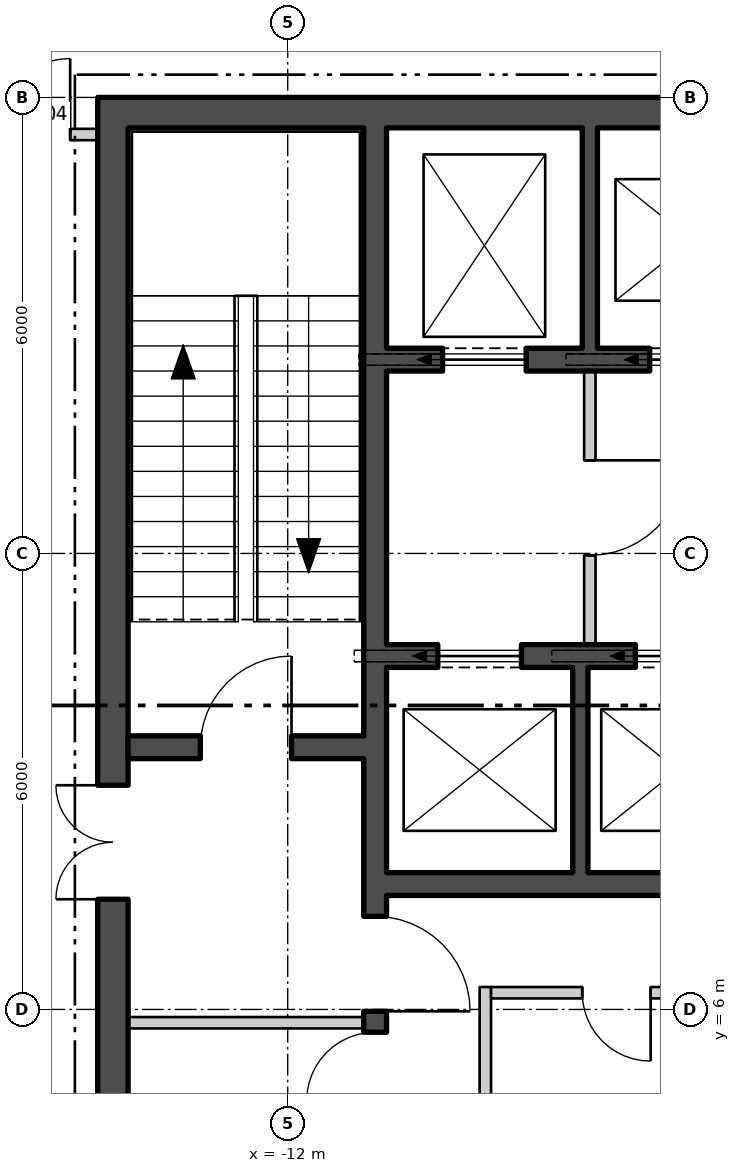
"""IFC4 building model, lengths in metres.
Left out: names, types, materials, properties, quantities, classifications, styles, units other than length and angle.
Written with IfcOpenShell. Run it as: python <this file> out.ifc"""

import sys

from ifc_helpers import new_model, si_unit, direction, frame, frame_2d, origin, place, context, subcontext, project, spatial, polyline, rectangle, outline, extrude, element, fill, save


model = new_model("IFC4")
c1 = context("Model", 3, precision=1e-05, world=origin(), true_north=direction((0.0, 1.0)))
c2 = subcontext(c1, "Body", "Model", "MODEL_VIEW")
j1 = project(units=[si_unit("LENGTHUNIT", "METRE"), si_unit("PLANEANGLEUNIT", "RADIAN")], contexts=[c1])
p1 = place(None, origin())
s1 = spatial("IfcSite", under=j1, at=p1, CompositionType="ELEMENT")
p2 = place(p1, origin())
s2 = spatial("IfcBuilding", under=s1, at=p2, CompositionType="ELEMENT")
p3 = place(p2, frame((0.0, 0.0, 321.0)))
s3 = spatial("IfcBuildingStorey", under=s2, at=p3, CompositionType="ELEMENT", Elevation=321.0)
p4 = place(p3, frame((-24.875, 16.493, -0.18), z_axis=(0.0, 0.0, 1.0), x_axis=(0.500000141277, -0.866025322218, 0.0)))
e1 = element("IfcWall", 1, at=p4, inside=s3, PredefinedType="SOLIDWALL", context=c2, shape_type="SweptSolid", body=[
    extrude(outline(polyline([(-0.13, -0.225), (45.86, -0.225), (45.6, 0.225), (0.13, 0.225), (-0.13, -0.225)])), origin(), (0.0, 0.0, 1.0), 3.98),
])
p5 = place(p4, frame((1.424, 0.0, 1.08)))
e2 = element("IfcOpeningElement", 2, at=p5, cuts=e1, PredefinedType="OPENING", context=c2, shape_type="SweptSolid", body=[
    extrude(rectangle(XDim=2.4, YDim=2.3, at=frame_2d((1.2, 1.15))), frame((0.0, 0.235, 0.0), z_axis=(0.0, -1.0, 0.0), x_axis=(1.0, 0.0, 0.0)), (0.0, 0.0, 1.0), 0.47),
])
p6 = place(p4, frame((5.892, 0.0, 1.08)))
e3 = element("IfcOpeningElement", 3, at=p6, cuts=e1, PredefinedType="OPENING", context=c2, shape_type="SweptSolid", body=[
    extrude(rectangle(XDim=2.4, YDim=2.3, at=frame_2d((1.2, 1.15))), frame((0.0, 0.235, 0.0), z_axis=(0.0, -1.0, 0.0), x_axis=(1.0, 0.0, 0.0)), (0.0, 0.0, 1.0), 0.47),
])
p7 = place(p4, frame((10.399, 0.0, 1.08)))
e4 = element("IfcOpeningElement", 4, at=p7, cuts=e1, PredefinedType="OPENING", context=c2, shape_type="SweptSolid", body=[
    extrude(rectangle(XDim=2.4, YDim=2.3, at=frame_2d((1.2, 1.15))), frame((0.0, 0.235, 0.0), z_axis=(0.0, -1.0, 0.0), x_axis=(1.0, 0.0, 0.0)), (0.0, 0.0, 1.0), 0.47),
])
p8 = place(p4, frame((14.905, 0.0, 1.08)))
e5 = element("IfcOpeningElement", 5, at=p8, cuts=e1, PredefinedType="OPENING", context=c2, shape_type="SweptSolid", body=[
    extrude(rectangle(XDim=2.4, YDim=2.3, at=frame_2d((1.2, 1.15))), frame((0.0, 0.235, 0.0), z_axis=(0.0, -1.0, 0.0), x_axis=(1.0, 0.0, 0.0)), (0.0, 0.0, 1.0), 0.47),
])
p9 = place(p4, frame((19.412, 0.0, 1.08)))
e6 = element("IfcOpeningElement", 6, at=p9, cuts=e1, PredefinedType="OPENING", context=c2, shape_type="SweptSolid", body=[
    extrude(rectangle(XDim=2.4, YDim=2.3, at=frame_2d((1.2, 1.15))), frame((0.0, 0.235, 0.0), z_axis=(0.0, -1.0, 0.0), x_axis=(1.0, 0.0, 0.0)), (0.0, 0.0, 1.0), 0.47),
])
p10 = place(p4, frame((23.918, 0.0, 1.08)))
e7 = element("IfcOpeningElement", 7, at=p10, cuts=e1, PredefinedType="OPENING", context=c2, shape_type="SweptSolid", body=[
    extrude(rectangle(XDim=2.4, YDim=2.3, at=frame_2d((1.2, 1.15))), frame((0.0, 0.235, 0.0), z_axis=(0.0, -1.0, 0.0), x_axis=(1.0, 0.0, 0.0)), (0.0, 0.0, 1.0), 0.47),
])
p11 = place(p4, frame((28.425, 0.0, 1.08)))
e8 = element("IfcOpeningElement", 8, at=p11, cuts=e1, PredefinedType="OPENING", context=c2, shape_type="SweptSolid", body=[
    extrude(rectangle(XDim=2.4, YDim=2.3, at=frame_2d((1.2, 1.15))), frame((0.0, 0.235, 0.0), z_axis=(0.0, -1.0, 0.0), x_axis=(1.0, 0.0, 0.0)), (0.0, 0.0, 1.0), 0.47),
])
p12 = place(p4, frame((37.438, 0.0, 1.08)))
e9 = element("IfcOpeningElement", 9, at=p12, cuts=e1, PredefinedType="OPENING", context=c2, shape_type="SweptSolid", body=[
    extrude(rectangle(XDim=2.4, YDim=2.3, at=frame_2d((1.2, 1.15))), frame((0.0, 0.235, 0.0), z_axis=(0.0, -1.0, 0.0), x_axis=(1.0, 0.0, 0.0)), (0.0, 0.0, 1.0), 0.47),
])
p13 = place(p4, frame((41.907, 0.0, 1.08)))
e10 = element("IfcOpeningElement", 10, at=p13, cuts=e1, PredefinedType="OPENING", context=c2, shape_type="SweptSolid", body=[
    extrude(rectangle(XDim=2.4, YDim=2.3, at=frame_2d((1.2, 1.15))), frame((0.0, 0.235, 0.0), z_axis=(0.0, -1.0, 0.0), x_axis=(1.0, 0.0, 0.0)), (0.0, 0.0, 1.0), 0.47),
])
p14 = place(p3, frame((-14.5, 17.8, 0.0), z_axis=(0.0, 0.0, 1.0), x_axis=(1.0, 0.0, 0.0)))
e11 = element("IfcWall", 11, at=p14, inside=s3, PredefinedType="SHEAR", context=c2, shape_type="SweptSolid", body=[
    extrude(rectangle(XDim=29.0, YDim=0.4, at=frame_2d((14.5, 0.0))), origin(), (0.0, 0.0, 1.0), 4.0),
])
p15 = place(p3, frame((-14.3, 4.4, 0.0), z_axis=(0.0, 0.0, 1.0), x_axis=(0.0, 1.0, 0.0)))
e12 = element("IfcWall", 12, at=p15, inside=s3, PredefinedType="SHEAR", context=c2, shape_type="SweptSolid", body=[
    extrude(rectangle(XDim=13.2, YDim=0.4, at=frame_2d((6.6, 0.0))), origin(), (0.0, 0.0, 1.0), 4.0),
])
p16 = place(p15, frame((3.05, 0.0, 0.0)))
e13 = element("IfcOpeningElement", 13, at=p16, cuts=e12, PredefinedType="OPENING", context=c2, shape_type="SweptSolid", body=[
    extrude(rectangle(XDim=1.5, YDim=2.1, at=frame_2d((0.75, 1.05))), frame((0.0, 0.21, 0.0), z_axis=(0.0, -1.0, 0.0), x_axis=(1.0, 0.0, 0.0)), (0.0, 0.0, 1.0), 0.42),
])
p17 = place(p3, frame((-10.85, 4.4, 0.0), z_axis=(0.0, 0.0, 1.0), x_axis=(0.0, 1.0, 0.0)))
e14 = element("IfcWall", 14, at=p17, inside=s3, PredefinedType="SHEAR", context=c2, shape_type="SweptSolid", body=[
    extrude(rectangle(XDim=13.2, YDim=0.3, at=frame_2d((6.6, 0.0))), origin(), (0.0, 0.0, 1.0), 4.0),
])
p18 = place(p17, frame((1.575, 0.0, 0.0)))
e15 = element("IfcOpeningElement", 15, at=p18, cuts=e14, PredefinedType="OPENING", context=c2, shape_type="SweptSolid", body=[
    extrude(rectangle(XDim=1.25, YDim=2.1, at=frame_2d((0.625, 1.05))), frame((0.0, 0.16, 0.0), z_axis=(0.0, -1.0, 0.0), x_axis=(1.0, 0.0, 0.0)), (0.0, 0.0, 1.0), 0.32),
])
p19 = place(p17, frame((0.4, 0.0, 0.0)))
e16 = element("IfcOpeningElement", 16, at=p19, cuts=e14, PredefinedType="OPENING", context=c2, shape_type="SweptSolid", body=[
    extrude(rectangle(XDim=0.9, YDim=2.1, at=frame_2d((0.45, 1.05))), frame((0.0, 0.16, 0.0), z_axis=(0.0, -1.0, 0.0), x_axis=(1.0, 0.0, 0.0)), (0.0, 0.0, 1.0), 0.32),
])
p20 = place(p3, frame((-14.1, 9.45, 0.0), z_axis=(0.0, 0.0, 1.0), x_axis=(1.0, 0.0, 0.0)))
e17 = element("IfcWall", 17, at=p20, inside=s3, PredefinedType="SHEAR", context=c2, shape_type="SweptSolid", body=[
    extrude(rectangle(XDim=3.1, YDim=0.3, at=frame_2d((1.55, 0.0))), origin(), (0.0, 0.0, 1.0), 4.0),
])
p21 = place(p20, frame((0.95, 0.0, 0.0)))
e18 = element("IfcOpeningElement", 18, at=p21, cuts=e17, PredefinedType="OPENING", context=c2, shape_type="SweptSolid", body=[
    extrude(rectangle(XDim=1.2, YDim=2.1, at=frame_2d((0.6, 1.05))), frame((0.0, 0.16, 0.0), z_axis=(0.0, -1.0, 0.0), x_axis=(1.0, 0.0, 0.0)), (0.0, 0.0, 1.0), 0.32),
])
p22 = place(p3, frame((-10.7, 14.55, 0.0), z_axis=(0.0, 0.0, 1.0), x_axis=(1.0, 0.0, 0.0)))
e19 = element("IfcWall", 19, at=p22, inside=s3, PredefinedType="SHEAR", context=c2, shape_type="SweptSolid", body=[
    extrude(rectangle(XDim=21.4, YDim=0.3, at=frame_2d((10.7, 0.0))), origin(), (0.0, 0.0, 1.0), 4.0),
])
p23 = place(p22, frame((0.738, 0.0, 0.0)))
e20 = element("IfcOpeningElement", 20, at=p23, cuts=e19, PredefinedType="OPENING", context=c2, shape_type="SweptSolid", body=[
    extrude(rectangle(XDim=1.1, YDim=2.1, at=frame_2d((0.55, 1.05))), frame((0.0, 0.16, 0.0), z_axis=(0.0, -1.0, 0.0), x_axis=(1.0, 0.0, 0.0)), (0.0, 0.0, 1.0), 0.32),
])
p24 = place(p22, frame((3.462, 0.0, 0.0)))
e21 = element("IfcOpeningElement", 21, at=p24, cuts=e19, PredefinedType="OPENING", context=c2, shape_type="SweptSolid", body=[
    extrude(rectangle(XDim=1.1, YDim=2.1, at=frame_2d((0.55, 1.05))), frame((0.0, 0.16, 0.0), z_axis=(0.0, -1.0, 0.0), x_axis=(1.0, 0.0, 0.0)), (0.0, 0.0, 1.0), 0.32),
])
p25 = place(p22, frame((6.138, 0.0, 0.0)))
e22 = element("IfcOpeningElement", 22, at=p25, cuts=e19, PredefinedType="OPENING", context=c2, shape_type="SweptSolid", body=[
    extrude(rectangle(XDim=1.1, YDim=2.1, at=frame_2d((0.55, 1.05))), frame((0.0, 0.16, 0.0), z_axis=(0.0, -1.0, 0.0), x_axis=(1.0, 0.0, 0.0)), (0.0, 0.0, 1.0), 0.32),
])
p26 = place(p22, frame((8.812, 0.0, 0.0)))
e23 = element("IfcOpeningElement", 23, at=p26, cuts=e19, PredefinedType="OPENING", context=c2, shape_type="SweptSolid", body=[
    extrude(rectangle(XDim=1.1, YDim=2.1, at=frame_2d((0.55, 1.05))), frame((0.0, 0.16, 0.0), z_axis=(0.0, -1.0, 0.0), x_axis=(1.0, 0.0, 0.0)), (0.0, 0.0, 1.0), 0.32),
])
p27 = place(p22, frame((19.562, 0.0, 0.0)))
e24 = element("IfcOpeningElement", 24, at=p27, cuts=e19, PredefinedType="OPENING", context=c2, shape_type="SweptSolid", body=[
    extrude(rectangle(XDim=1.1, YDim=2.1, at=frame_2d((0.55, 1.05))), frame((0.0, 0.16, 0.0), z_axis=(0.0, -1.0, 0.0), x_axis=(1.0, 0.0, 0.0)), (0.0, 0.0, 1.0), 0.32),
])
p28 = place(p22, frame((12.875, 0.0, 0.0)))
e25 = element("IfcOpeningElement", 25, at=p28, cuts=e19, PredefinedType="OPENING", context=c2, shape_type="SweptSolid", body=[
    extrude(rectangle(XDim=1.0, YDim=2.1, at=frame_2d((0.5, 1.05))), frame((0.0, 0.16, 0.0), z_axis=(0.0, -1.0, 0.0), x_axis=(1.0, 0.0, 0.0)), (0.0, 0.0, 1.0), 0.32),
])
p29 = place(p22, frame((16.887, 0.0, 0.0)))
e26 = element("IfcOpeningElement", 26, at=p29, cuts=e19, PredefinedType="OPENING", context=c2, shape_type="SweptSolid", body=[
    extrude(rectangle(XDim=1.0, YDim=2.1, at=frame_2d((0.5, 1.05))), frame((0.0, 0.16, 0.0), z_axis=(0.0, -1.0, 0.0), x_axis=(1.0, 0.0, 0.0)), (0.0, 0.0, 1.0), 0.32),
])
p30 = place(p3, frame((-10.7, 10.65, 0.0), z_axis=(0.0, 0.0, 1.0), x_axis=(1.0, 0.0, 0.0)))
e27 = element("IfcWall", 27, at=p30, inside=s3, PredefinedType="SHEAR", context=c2, shape_type="SweptSolid", body=[
    extrude(rectangle(XDim=10.3, YDim=0.3, at=frame_2d((5.15, 0.0))), origin(), (0.0, 0.0, 1.0), 4.0),
])
p31 = place(p30, frame((0.675, 0.0, 0.0)))
e28 = element("IfcOpeningElement", 28, at=p31, cuts=e27, PredefinedType="OPENING", context=c2, shape_type="SweptSolid", body=[
    extrude(rectangle(XDim=1.1, YDim=2.1, at=frame_2d((0.55, 1.05))), frame((0.0, 0.16, 0.0), z_axis=(0.0, -1.0, 0.0), x_axis=(1.0, 0.0, 0.0)), (0.0, 0.0, 1.0), 0.32),
])
p32 = place(p30, frame((3.275, 0.0, 0.0)))
e29 = element("IfcOpeningElement", 29, at=p32, cuts=e27, PredefinedType="OPENING", context=c2, shape_type="SweptSolid", body=[
    extrude(rectangle(XDim=1.1, YDim=2.1, at=frame_2d((0.55, 1.05))), frame((0.0, 0.16, 0.0), z_axis=(0.0, -1.0, 0.0), x_axis=(1.0, 0.0, 0.0)), (0.0, 0.0, 1.0), 0.32),
])
p33 = place(p30, frame((5.825, 0.0, 0.0)))
e30 = element("IfcOpeningElement", 30, at=p33, cuts=e27, PredefinedType="OPENING", context=c2, shape_type="SweptSolid", body=[
    extrude(rectangle(XDim=1.1, YDim=2.1, at=frame_2d((0.55, 1.05))), frame((0.0, 0.16, 0.0), z_axis=(0.0, -1.0, 0.0), x_axis=(1.0, 0.0, 0.0)), (0.0, 0.0, 1.0), 0.32),
])
p34 = place(p30, frame((8.425, 0.0, 0.0)))
e31 = element("IfcOpeningElement", 31, at=p34, cuts=e27, PredefinedType="OPENING", context=c2, shape_type="SweptSolid", body=[
    extrude(rectangle(XDim=1.0, YDim=2.1, at=frame_2d((0.5, 1.05))), frame((0.0, 0.16, 0.0), z_axis=(0.0, -1.0, 0.0), x_axis=(1.0, 0.0, 0.0)), (0.0, 0.0, 1.0), 0.32),
])
p35 = place(p3, frame((-10.7, 7.65, 0.0), z_axis=(0.0, 0.0, 1.0), x_axis=(1.0, 0.0, 0.0)))
e32 = element("IfcWall", 32, at=p35, inside=s3, PredefinedType="SHEAR", context=c2, shape_type="SweptSolid", body=[
    extrude(rectangle(XDim=10.3, YDim=0.3, at=frame_2d((5.15, 0.0))), origin(), (0.0, 0.0, 1.0), 4.0),
])
p36 = place(p3, frame((-8.025, 14.7, 0.0), z_axis=(0.0, 0.0, 1.0), x_axis=(0.0, 1.0, 0.0)))
e33 = element("IfcWall", 33, at=p36, inside=s3, PredefinedType="SHEAR", context=c2, shape_type="SweptSolid", body=[
    extrude(rectangle(XDim=2.9, YDim=0.2, at=frame_2d((1.45, 0.0))), origin(), (0.0, 0.0, 1.0), 4.0),
])
p37 = place(p3, frame((-8.15, 7.8, 0.0), z_axis=(0.0, 0.0, 1.0), x_axis=(0.0, 1.0, 0.0)))
e34 = element("IfcWall", 34, at=p37, inside=s3, PredefinedType="SHEAR", context=c2, shape_type="SweptSolid", body=[
    extrude(rectangle(XDim=2.7, YDim=0.2, at=frame_2d((1.35, 0.0))), origin(), (0.0, 0.0, 1.0), 4.0),
])
p38 = place(p3, frame((-8.025, 10.8, 0.0), z_axis=(0.0, 0.0, 1.0), x_axis=(0.0, 1.0, 0.0)))
e35 = element("IfcWall", 35, at=p38, inside=s3, PredefinedType="PARTITIONING", context=c2, shape_type="SweptSolid", body=[
    extrude(rectangle(XDim=3.6, YDim=0.15, at=frame_2d((1.8, 0.0))), origin(), (0.0, 0.0, 1.0), 4.0),
])
p39 = place(p38, frame((1.175, 0.0, 0.0)))
e36 = element("IfcOpeningElement", 36, at=p39, cuts=e35, PredefinedType="OPENING", context=c2, shape_type="SweptSolid", body=[
    extrude(rectangle(XDim=1.25, YDim=2.1, at=frame_2d((0.625, 1.05))), frame((0.0, 0.085, 0.0), z_axis=(0.0, -1.0, 0.0), x_axis=(1.0, 0.0, 0.0)), (0.0, 0.0, 1.0), 0.17),
])
p40 = place(p3, frame((-14.1, 5.825, 0.0), z_axis=(0.0, 0.0, 1.0), x_axis=(1.0, 0.0, 0.0)))
e37 = element("IfcWall", 37, at=p40, inside=s3, PredefinedType="PARTITIONING", context=c2, shape_type="SweptSolid", body=[
    extrude(rectangle(XDim=3.1, YDim=0.15, at=frame_2d((1.55, 0.0))), origin(), (0.0, 0.0, 1.0), 4.0),
])
p41 = place(p3, frame((-9.4, 4.4, 0.0), z_axis=(0.0, 0.0, 1.0), x_axis=(0.0, 1.0, 0.0)))
e38 = element("IfcWall", 38, at=p41, inside=s3, PredefinedType="PARTITIONING", context=c2, shape_type="SweptSolid", body=[
    extrude(rectangle(XDim=1.895, YDim=0.15, at=frame_2d((0.948, 0.0))), origin(), (0.0, 0.0, 1.0), 4.0),
])
p42 = place(p3, frame((-9.325, 6.22, 0.0), z_axis=(0.0, 0.0, 1.0), x_axis=(1.0, 0.0, 0.0)))
e39 = element("IfcWall", 39, at=p42, inside=s3, PredefinedType="PARTITIONING", context=c2, shape_type="SweptSolid", body=[
    extrude(rectangle(XDim=3.3, YDim=0.15, at=frame_2d((1.65, 0.0))), origin(), (0.0, 0.0, 1.0), 4.0),
])
p43 = place(p42, frame((1.2, 0.0, 0.0)))
e40 = element("IfcOpeningElement", 40, at=p43, cuts=e39, PredefinedType="OPENING", context=c2, shape_type="SweptSolid", body=[
    extrude(rectangle(XDim=0.9, YDim=2.1, at=frame_2d((0.45, 1.05))), frame((0.0, 0.085, 0.0), z_axis=(0.0, -1.0, 0.0), x_axis=(1.0, 0.0, 0.0)), (0.0, 0.0, 1.0), 0.17),
])
p44 = place(p3, frame((-16.225, 17.512, 0.0), z_axis=(0.0, 0.0, 1.0), x_axis=(1.0, 0.0, 0.0)))
e41 = element("IfcWall", 41, at=p44, inside=s3, PredefinedType="PARTITIONING", context=c2, shape_type="SweptSolid", body=[
    extrude(rectangle(XDim=1.725, YDim=0.15, at=frame_2d((0.863, 0.0))), origin(), (0.0, 0.0, 1.0), 4.0),
])
p45 = place(p44, frame((0.363, 0.0, 0.0)))
e42 = element("IfcOpeningElement", 42, at=p45, cuts=e41, PredefinedType="OPENING", context=c2, shape_type="SweptSolid", body=[
    extrude(rectangle(XDim=1.0, YDim=2.1, at=frame_2d((0.5, 1.05))), frame((0.0, 0.085, 0.0), z_axis=(0.0, -1.0, 0.0), x_axis=(1.0, 0.0, 0.0)), (0.0, 0.0, 1.0), 0.17),
])
p46 = place(p23, origin())
e43 = element("IfcDoor", 43, at=p46, inside=s3, OperationType="SLIDING_TO_LEFT", PredefinedType="DOOR", context=c2, shape_type="SweptSolid", body=[
    extrude(rectangle(XDim=1.1, YDim=2.1, at=frame_2d((0.55, 1.05))), frame((0.0, 0.025, 0.0), z_axis=(0.0, -1.0, 0.0), x_axis=(1.0, 0.0, 0.0)), (0.0, 0.0, 1.0), 0.05),
])
fill(e20, e43)
p47 = place(p24, origin())
e44 = element("IfcDoor", 44, at=p47, inside=s3, OperationType="SLIDING_TO_LEFT", PredefinedType="DOOR", context=c2, shape_type="SweptSolid", body=[
    extrude(rectangle(XDim=1.1, YDim=2.1, at=frame_2d((0.55, 1.05))), frame((0.0, 0.025, 0.0), z_axis=(0.0, -1.0, 0.0), x_axis=(1.0, 0.0, 0.0)), (0.0, 0.0, 1.0), 0.05),
])
fill(e21, e44)
p48 = place(p31, origin())
e45 = element("IfcDoor", 45, at=p48, inside=s3, OperationType="SLIDING_TO_LEFT", PredefinedType="DOOR", context=c2, shape_type="SweptSolid", body=[
    extrude(rectangle(XDim=1.1, YDim=2.1, at=frame_2d((0.55, 1.05))), frame((0.0, 0.025, 0.0), z_axis=(0.0, -1.0, 0.0), x_axis=(1.0, 0.0, 0.0)), (0.0, 0.0, 1.0), 0.05),
])
fill(e28, e45)
p49 = place(p32, origin())
e46 = element("IfcDoor", 46, at=p49, inside=s3, OperationType="SLIDING_TO_LEFT", PredefinedType="DOOR", context=c2, shape_type="SweptSolid", body=[
    extrude(rectangle(XDim=1.1, YDim=2.1, at=frame_2d((0.55, 1.05))), frame((0.0, 0.025, 0.0), z_axis=(0.0, -1.0, 0.0), x_axis=(1.0, 0.0, 0.0)), (0.0, 0.0, 1.0), 0.05),
])
fill(e29, e46)
p50 = place(p39, origin())
e47 = element("IfcDoor", 47, at=p50, inside=s3, OperationType="SINGLE_SWING_RIGHT", PredefinedType="DOOR", context=c2, shape_type="SweptSolid", body=[
    extrude(rectangle(XDim=1.25, YDim=2.1, at=frame_2d((0.625, 1.05))), frame((0.0, 0.025, 0.0), z_axis=(0.0, -1.0, 0.0), x_axis=(1.0, 0.0, 0.0)), (0.0, 0.0, 1.0), 0.05),
])
fill(e36, e47)
p51 = place(p21, origin())
e48 = element("IfcDoor", 48, at=p51, inside=s3, OperationType="SINGLE_SWING_LEFT", PredefinedType="DOOR", context=c2, shape_type="SweptSolid", body=[
    extrude(rectangle(XDim=1.2, YDim=2.1, at=frame_2d((0.6, 1.05))), frame((0.0, 0.025, 0.0), z_axis=(0.0, -1.0, 0.0), x_axis=(1.0, 0.0, 0.0)), (0.0, 0.0, 1.0), 0.05),
])
fill(e18, e48)
p52 = place(p18, origin())
e49 = element("IfcDoor", 49, at=p52, inside=s3, OperationType="SINGLE_SWING_LEFT", PredefinedType="DOOR", context=c2, shape_type="SweptSolid", body=[
    extrude(rectangle(XDim=1.25, YDim=2.1, at=frame_2d((0.625, 1.05))), frame((0.0, 0.025, 0.0), z_axis=(0.0, -1.0, 0.0), x_axis=(1.0, 0.0, 0.0)), (0.0, 0.0, 1.0), 0.05),
])
fill(e15, e49)
p53 = place(p16, origin())
e50 = element("IfcDoor", 50, at=p53, inside=s3, OperationType="DOUBLE_DOOR_SINGLE_SWING", PredefinedType="DOOR", context=c2, shape_type="SweptSolid", body=[
    extrude(rectangle(XDim=1.5, YDim=2.1, at=frame_2d((0.75, 1.05))), frame((0.0, 0.025, 0.0), z_axis=(0.0, -1.0, 0.0), x_axis=(1.0, 0.0, 0.0)), (0.0, 0.0, 1.0), 0.05),
])
fill(e13, e50)
p54 = place(p19, origin())
e51 = element("IfcDoor", 51, at=p54, inside=s3, OperationType="SINGLE_SWING_RIGHT", PredefinedType="DOOR", context=c2, shape_type="SweptSolid", body=[
    extrude(rectangle(XDim=0.9, YDim=2.1, at=frame_2d((0.45, 1.05))), frame((0.0, 0.025, 0.0), z_axis=(0.0, -1.0, 0.0), x_axis=(1.0, 0.0, 0.0)), (0.0, 0.0, 1.0), 0.05),
])
fill(e16, e51)
p55 = place(p43, origin())
e52 = element("IfcDoor", 52, at=p55, inside=s3, OperationType="SINGLE_SWING_RIGHT", PredefinedType="DOOR", context=c2, shape_type="SweptSolid", body=[
    extrude(rectangle(XDim=0.9, YDim=2.1, at=frame_2d((0.45, 1.05))), frame((0.0, 0.025, 0.0), z_axis=(0.0, -1.0, 0.0), x_axis=(1.0, 0.0, 0.0)), (0.0, 0.0, 1.0), 0.05),
])
fill(e40, e52)
p56 = place(p45, origin())
e53 = element("IfcDoor", 53, at=p56, inside=s3, OperationType="SINGLE_SWING_LEFT", PredefinedType="DOOR", context=c2, shape_type="SweptSolid", body=[
    extrude(rectangle(XDim=1.0, YDim=2.1, at=frame_2d((0.5, 1.05))), frame((0.0, 0.025, 0.0), z_axis=(0.0, -1.0, 0.0), x_axis=(1.0, 0.0, 0.0)), (0.0, 0.0, 1.0), 0.05),
])
fill(e42, e53)
save(model, sys.argv[1])
